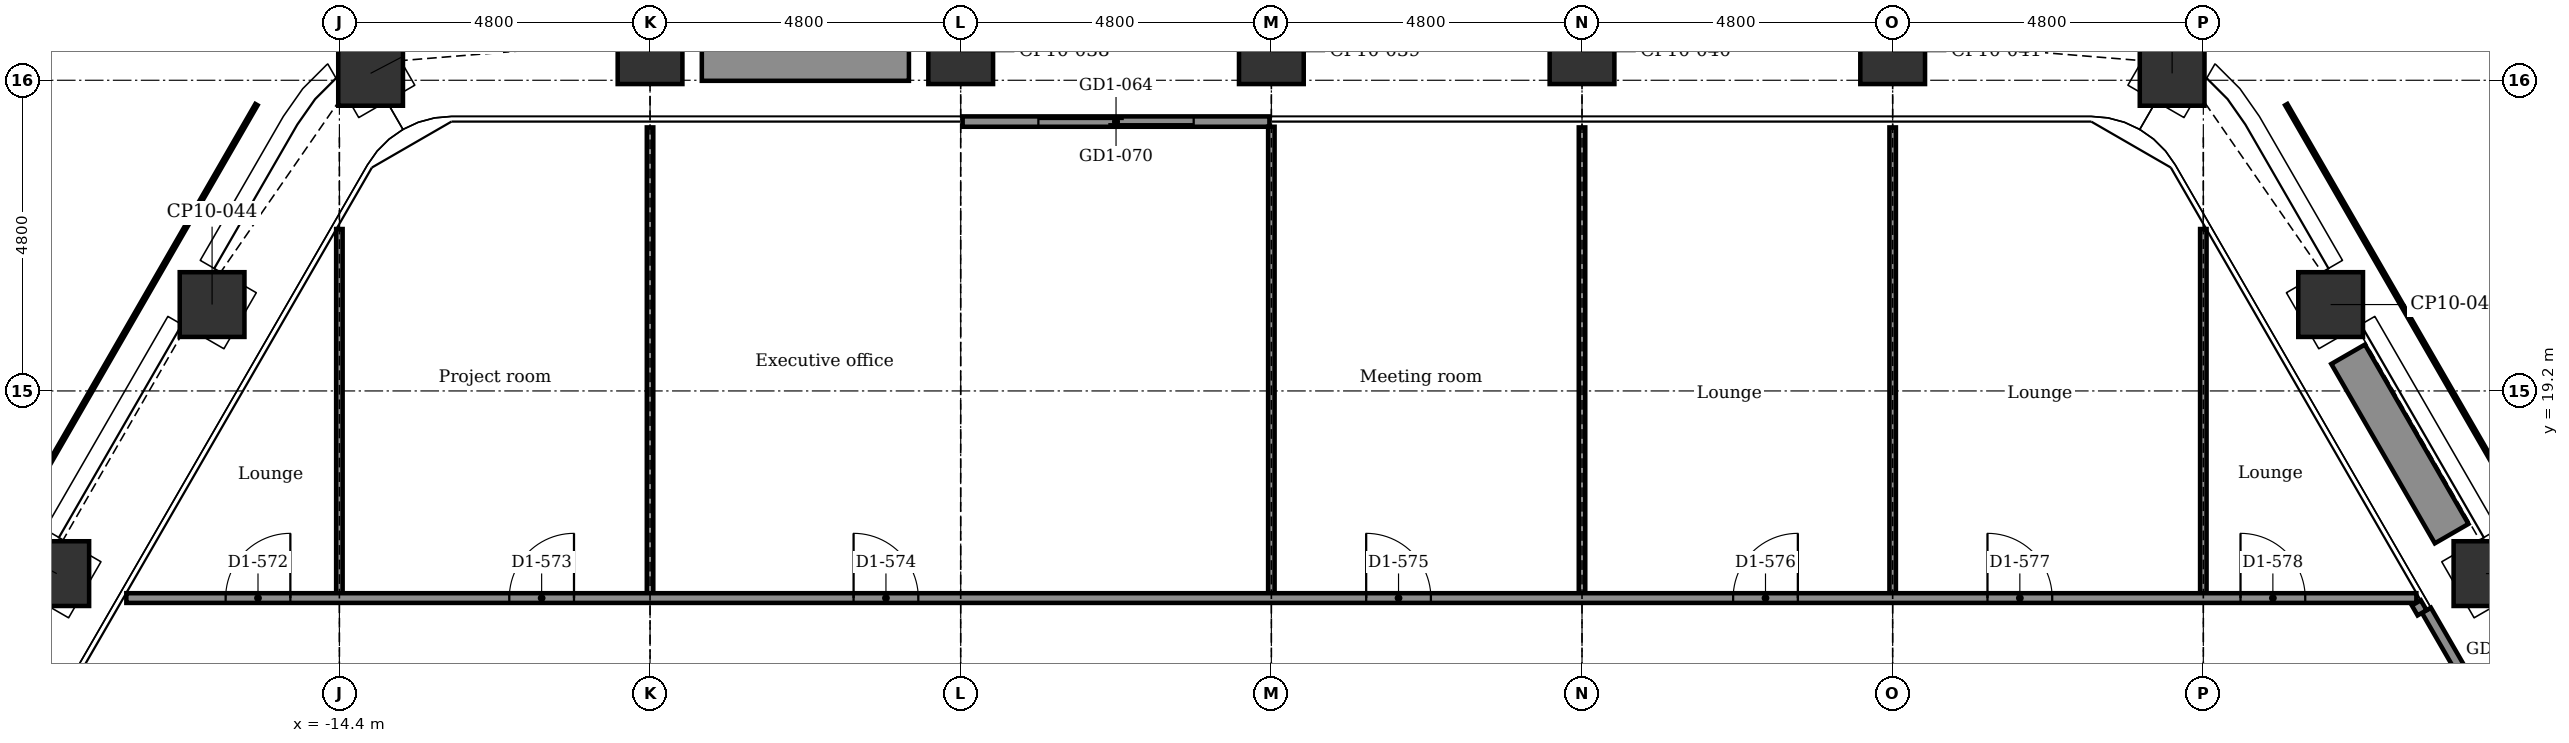
"""IFC4 building model, lengths in metres.
Left out: names, types, materials, properties, quantities, classifications, styles, units other than length and angle.
Written with IfcOpenShell. Run it as: python <this file> out.ifc"""

import sys

from ifc_helpers import new_model, si_unit, direction, frame, frame_2d, origin, origin_2d, place, context, subcontext, project, spatial, rectangle, extrude, element, fill, save


model = new_model("IFC4")
c1 = context("Model", 3, precision=1e-05, world=origin(), true_north=direction((0.0, 1.0)))
c2 = subcontext(c1, "Body", "Model", "MODEL_VIEW")
j1 = project(units=[si_unit("LENGTHUNIT", "METRE"), si_unit("PLANEANGLEUNIT", "RADIAN")], contexts=[c1])
p1 = place(None, origin())
s1 = spatial("IfcSite", under=j1, at=p1, CompositionType="ELEMENT")
p2 = place(p1, origin())
s2 = spatial("IfcBuilding", under=s1, at=p2, CompositionType="ELEMENT")
p3 = place(p2, frame((0.0, 0.0, 201.2)))
s3 = spatial("IfcBuildingStorey", under=s2, at=p3, CompositionType="ELEMENT", Elevation=201.2)
for number, where, z_axis, x_axis in (
    (1, (-13.918, 24.107, -0.15), (0.0, 0.0, 1.0), (0.866, 0.5, 0.0)),
    (2, (-9.6, 24.442, -0.15), (0.0, 0.0, 1.0), (1.0, 0.0, 0.0)),
    (3, (-4.8, 24.442, -0.15), (0.0, 0.0, 1.0), (1.0, 0.0, 0.0)),
    (4, (0.0, 24.442, -0.15), (0.0, 0.0, 1.0), (1.0, 0.0, 0.0)),
    (5, (4.8, 24.442, -0.15), (0.0, 0.0, 1.0), (1.0, 0.0, 0.0)),
    (6, (9.6, 24.442, -0.15), (0.0, 0.0, 1.0), (1.0, 0.0, 0.0)),
    (7, (13.918, 24.107, -0.15), (0.0, 0.0, 1.0), (0.5, 0.866, 0.0)),
    (8, (16.367, 20.535, -0.15), (0.0, 0.0, 1.0), (0.866, 0.5, 0.0)),
    (9, (18.767, 16.378, -0.15), (0.0, 0.0, 1.0), (0.866, 0.5, 0.0)),
    (10, (-18.767, 16.378, -0.15), (0.0, 0.0, 1.0), (0.5, 0.866, 0.0)),
    (11, (-16.367, 20.535, -0.15), (0.0, 0.0, 1.0), (0.5, 0.866, 0.0)),
):
    element("IfcColumn", number, at=place(p3, frame(where, z_axis=z_axis, x_axis=x_axis)), inside=s3, PredefinedType="COLUMN", context=c2, shape_type="SweptSolid", body=[
        extrude(rectangle(XDim=1.0, YDim=1.0, at=origin_2d()), origin(), (0.0, 0.0, 1.0), 3.9),
    ])
p4 = place(p3, frame((-4.77, 23.362, 0.0), z_axis=(0.0, 0.0, 1.0), x_axis=(1.0, 0.0, 0.0)))
e12 = element("IfcWall", 12, at=p4, inside=s3, PredefinedType="PARTITIONING", context=c2, shape_type="SweptSolid", body=[
    extrude(rectangle(XDim=4.74, YDim=0.16, at=frame_2d((2.37, 0.0))), origin(), (0.0, 0.0, 1.0), 3.75),
])
p5 = place(p4, frame((1.17, 0.0, 0.0)))
e13 = element("IfcOpeningElement", 13, at=p5, cuts=e12, PredefinedType="OPENING", context=c2, shape_type="SweptSolid", body=[
    extrude(rectangle(XDim=2.4, YDim=2.4, at=frame_2d((1.2, 1.2))), frame((0.0, 0.09, 0.0), z_axis=(0.0, -1.0, 0.0), x_axis=(1.0, 0.0, 0.0)), (0.0, 0.0, 1.0), 0.18),
])
p6 = place(p3, frame((17.847, 15.812, 0.0), z_axis=(0.0, 0.0, 1.0), x_axis=(0.5000167099, -0.866015756104, 0.0)))
e14 = element("IfcWall", 14, at=p6, inside=s3, PredefinedType="PARTITIONING", context=c2, shape_type="SweptSolid", body=[
    extrude(rectangle(XDim=4.74, YDim=0.16, at=frame_2d((2.37, 0.0))), origin(), (0.0, 0.0, 1.0), 3.75),
])
p7 = place(p6, frame((1.17, 0.0, 0.0)))
e15 = element("IfcOpeningElement", 15, at=p7, cuts=e14, PredefinedType="OPENING", context=c2, shape_type="SweptSolid", body=[
    extrude(rectangle(XDim=2.4, YDim=2.4, at=frame_2d((1.2, 1.2))), frame((0.0, 0.09, 0.0), z_axis=(0.0, -1.0, 0.0), x_axis=(1.0, 0.0, 0.0)), (0.0, 0.0, 1.0), 0.18),
])
for number, where, z_axis, x_axis in (
    (16, (-8.8, 24.292, 0.0), (0.0, 0.0, 1.0), (1.0, 0.0, 0.0)),
    (17, (16.637, 19.767, 0.0), (0.0, 0.0, 1.0), (0.5, -0.866, 0.0)),
):
    element("IfcWall", number, at=place(p3, frame(where, z_axis=z_axis, x_axis=x_axis)), inside=s3, PredefinedType="USERDEFINED", context=c2, shape_type="SweptSolid", body=[
        extrude(rectangle(XDim=3.2, YDim=0.6, at=frame_2d((1.6, 0.0))), origin(), (0.0, 0.0, 1.0), 0.7),
    ])
p8 = place(p3, frame((14.4, 16.0, 0.0), z_axis=(0.0, 0.0, 1.0), x_axis=(0.0, 1.0, 0.0)))
e18 = element("IfcWall", 18, at=p8, inside=s3, PredefinedType="PARTITIONING", context=c2, shape_type="SweptSolid", body=[
    extrude(rectangle(XDim=5.701, YDim=0.1, at=frame_2d((2.851, 0.0))), origin(), (0.0, 0.0, 1.0), 3.066),
])
for number, where, z_axis, x_axis in (
    (19, (9.6, 16.0, 0.0), (0.0, 0.0, 1.0), (0.0, 1.0, 0.0)),
    (20, (4.8, 16.0, 0.0), (0.0, 0.0, 1.0), (0.0, 1.0, 0.0)),
):
    element("IfcWall", number, at=place(p3, frame(where, z_axis=z_axis, x_axis=x_axis)), inside=s3, PredefinedType="PARTITIONING", context=c2, shape_type="SweptSolid", body=[
        extrude(rectangle(XDim=7.271, YDim=0.1, at=frame_2d((3.636, 0.0))), origin(), (0.0, 0.0, 1.0), 3.066),
    ])
p9 = place(p3, frame((0.0, 16.0, 0.0), z_axis=(0.0, 0.0, 1.0), x_axis=(0.0, 1.0, 0.0)))
e21 = element("IfcWall", 21, at=p9, inside=s3, PredefinedType="PARTITIONING", context=c2, shape_type="SweptSolid", body=[
    extrude(rectangle(XDim=7.281, YDim=0.1, at=frame_2d((3.641, 0.0))), origin(), (0.0, 0.0, 1.0), 3.066),
])
p10 = place(p3, frame((-9.6, 16.0, 0.0), z_axis=(0.0, 0.0, 1.0), x_axis=(0.0, 1.0, 0.0)))
e22 = element("IfcWall", 22, at=p10, inside=s3, PredefinedType="PARTITIONING", context=c2, shape_type="SweptSolid", body=[
    extrude(rectangle(XDim=7.271, YDim=0.1, at=frame_2d((3.636, 0.0))), origin(), (0.0, 0.0, 1.0), 3.066),
])
p11 = place(p3, frame((-14.4, 16.0, 0.0), z_axis=(0.0, 0.0, 1.0), x_axis=(0.0, 1.0, 0.0)))
e23 = element("IfcWall", 23, at=p11, inside=s3, PredefinedType="PARTITIONING", context=c2, shape_type="SweptSolid", body=[
    extrude(rectangle(XDim=5.701, YDim=0.1, at=frame_2d((2.851, 0.0))), origin(), (0.0, 0.0, 1.0), 3.066),
])
p12 = place(p3, frame((-17.692, 16.0, 0.0), z_axis=(0.0, 0.0, 1.0), x_axis=(1.0, 0.0, 0.0)))
e24 = element("IfcWall", 24, at=p12, inside=s3, PredefinedType="PARTITIONING", context=c2, shape_type="SweptSolid", body=[
    extrude(rectangle(XDim=35.384, YDim=0.15, at=frame_2d((17.692, 0.0))), origin(), (0.0, 0.0, 1.0), 3.75),
])
p13 = place(p12, frame((1.534, 0.0, 0.0)))
e25 = element("IfcOpeningElement", 25, at=p13, cuts=e24, PredefinedType="OPENING", context=c2, shape_type="SweptSolid", body=[
    extrude(rectangle(XDim=1.0, YDim=2.1, at=frame_2d((0.5, 1.05))), frame((0.0, 0.085, 0.0), z_axis=(0.0, -1.0, 0.0), x_axis=(1.0, 0.0, 0.0)), (0.0, 0.0, 1.0), 0.17),
])
p14 = place(p12, frame((5.917, 0.0, 0.0)))
e26 = element("IfcOpeningElement", 26, at=p14, cuts=e24, PredefinedType="OPENING", context=c2, shape_type="SweptSolid", body=[
    extrude(rectangle(XDim=1.0, YDim=2.1, at=frame_2d((0.5, 1.05))), frame((0.0, 0.085, 0.0), z_axis=(0.0, -1.0, 0.0), x_axis=(1.0, 0.0, 0.0)), (0.0, 0.0, 1.0), 0.17),
])
p15 = place(p12, frame((11.237, 0.0, 0.0)))
e27 = element("IfcOpeningElement", 27, at=p15, cuts=e24, PredefinedType="OPENING", context=c2, shape_type="SweptSolid", body=[
    extrude(rectangle(XDim=1.0, YDim=2.1, at=frame_2d((0.5, 1.05))), frame((0.0, 0.085, 0.0), z_axis=(0.0, -1.0, 0.0), x_axis=(1.0, 0.0, 0.0)), (0.0, 0.0, 1.0), 0.17),
])
p16 = place(p12, frame((19.157, 0.0, 0.0)))
e28 = element("IfcOpeningElement", 28, at=p16, cuts=e24, PredefinedType="OPENING", context=c2, shape_type="SweptSolid", body=[
    extrude(rectangle(XDim=1.0, YDim=2.1, at=frame_2d((0.5, 1.05))), frame((0.0, 0.085, 0.0), z_axis=(0.0, -1.0, 0.0), x_axis=(1.0, 0.0, 0.0)), (0.0, 0.0, 1.0), 0.17),
])
p17 = place(p12, frame((24.827, 0.0, 0.0)))
e29 = element("IfcOpeningElement", 29, at=p17, cuts=e24, PredefinedType="OPENING", context=c2, shape_type="SweptSolid", body=[
    extrude(rectangle(XDim=1.0, YDim=2.1, at=frame_2d((0.5, 1.05))), frame((0.0, 0.085, 0.0), z_axis=(0.0, -1.0, 0.0), x_axis=(1.0, 0.0, 0.0)), (0.0, 0.0, 1.0), 0.17),
])
p18 = place(p12, frame((28.757, 0.0, 0.0)))
e30 = element("IfcOpeningElement", 30, at=p18, cuts=e24, PredefinedType="OPENING", context=c2, shape_type="SweptSolid", body=[
    extrude(rectangle(XDim=1.0, YDim=2.1, at=frame_2d((0.5, 1.05))), frame((0.0, 0.085, 0.0), z_axis=(0.0, -1.0, 0.0), x_axis=(1.0, 0.0, 0.0)), (0.0, 0.0, 1.0), 0.17),
])
p19 = place(p12, frame((32.667, 0.0, 0.0)))
e31 = element("IfcOpeningElement", 31, at=p19, cuts=e24, PredefinedType="OPENING", context=c2, shape_type="SweptSolid", body=[
    extrude(rectangle(XDim=1.0, YDim=2.1, at=frame_2d((0.5, 1.05))), frame((0.0, 0.085, 0.0), z_axis=(0.0, -1.0, 0.0), x_axis=(1.0, 0.0, 0.0)), (0.0, 0.0, 1.0), 0.17),
])
p20 = place(p3, frame((17.78, 15.772, 0.0), z_axis=(0.0, 0.0, 1.0), x_axis=(-0.499841654076, 0.866116805547, 0.0)))
e32 = element("IfcWall", 32, at=p20, inside=s3, PredefinedType="PARTITIONING", context=c2, shape_type="SweptSolid", body=[
    extrude(rectangle(XDim=0.177, YDim=0.16, at=frame_2d((0.089, 0.0))), origin(), (0.0, 0.0, 1.0), 3.75),
])
p21 = place(p5, origin())
e33 = element("IfcDoor", 33, at=p21, inside=s3, OperationType="DOUBLE_DOOR_SLIDING", PredefinedType="DOOR", context=c2, shape_type="SweptSolid", body=[
    extrude(rectangle(XDim=2.4, YDim=2.4, at=frame_2d((1.2, 1.2))), frame((0.0, 0.025, 0.0), z_axis=(0.0, -1.0, 0.0), x_axis=(1.0, 0.0, 0.0)), (0.0, 0.0, 1.0), 0.05),
])
fill(e13, e33)
p22 = place(p13, origin())
e34 = element("IfcDoor", 34, at=p22, inside=s3, OperationType="SINGLE_SWING_RIGHT", PredefinedType="DOOR", context=c2, shape_type="SweptSolid", body=[
    extrude(rectangle(XDim=1.0, YDim=2.1, at=frame_2d((0.5, 1.05))), frame((0.0, 0.025, 0.0), z_axis=(0.0, -1.0, 0.0), x_axis=(1.0, 0.0, 0.0)), (0.0, 0.0, 1.0), 0.05),
])
fill(e25, e34)
p23 = place(p14, origin())
e35 = element("IfcDoor", 35, at=p23, inside=s3, OperationType="SINGLE_SWING_RIGHT", PredefinedType="DOOR", context=c2, shape_type="SweptSolid", body=[
    extrude(rectangle(XDim=1.0, YDim=2.1, at=frame_2d((0.5, 1.05))), frame((0.0, 0.025, 0.0), z_axis=(0.0, -1.0, 0.0), x_axis=(1.0, 0.0, 0.0)), (0.0, 0.0, 1.0), 0.05),
])
fill(e26, e35)
p24 = place(p15, origin())
e36 = element("IfcDoor", 36, at=p24, inside=s3, OperationType="SINGLE_SWING_LEFT", PredefinedType="DOOR", context=c2, shape_type="SweptSolid", body=[
    extrude(rectangle(XDim=1.0, YDim=2.1, at=frame_2d((0.5, 1.05))), frame((0.0, 0.025, 0.0), z_axis=(0.0, -1.0, 0.0), x_axis=(1.0, 0.0, 0.0)), (0.0, 0.0, 1.0), 0.05),
])
fill(e27, e36)
p25 = place(p16, origin())
e37 = element("IfcDoor", 37, at=p25, inside=s3, OperationType="SINGLE_SWING_LEFT", PredefinedType="DOOR", context=c2, shape_type="SweptSolid", body=[
    extrude(rectangle(XDim=1.0, YDim=2.1, at=frame_2d((0.5, 1.05))), frame((0.0, 0.025, 0.0), z_axis=(0.0, -1.0, 0.0), x_axis=(1.0, 0.0, 0.0)), (0.0, 0.0, 1.0), 0.05),
])
fill(e28, e37)
p26 = place(p17, origin())
e38 = element("IfcDoor", 38, at=p26, inside=s3, OperationType="SINGLE_SWING_RIGHT", PredefinedType="DOOR", context=c2, shape_type="SweptSolid", body=[
    extrude(rectangle(XDim=1.0, YDim=2.1, at=frame_2d((0.5, 1.05))), frame((0.0, 0.025, 0.0), z_axis=(0.0, -1.0, 0.0), x_axis=(1.0, 0.0, 0.0)), (0.0, 0.0, 1.0), 0.05),
])
fill(e29, e38)
p27 = place(p18, origin())
e39 = element("IfcDoor", 39, at=p27, inside=s3, OperationType="SINGLE_SWING_LEFT", PredefinedType="DOOR", context=c2, shape_type="SweptSolid", body=[
    extrude(rectangle(XDim=1.0, YDim=2.1, at=frame_2d((0.5, 1.05))), frame((0.0, 0.025, 0.0), z_axis=(0.0, -1.0, 0.0), x_axis=(1.0, 0.0, 0.0)), (0.0, 0.0, 1.0), 0.05),
])
fill(e30, e39)
p28 = place(p19, origin())
e40 = element("IfcDoor", 40, at=p28, inside=s3, OperationType="SINGLE_SWING_LEFT", PredefinedType="DOOR", context=c2, shape_type="SweptSolid", body=[
    extrude(rectangle(XDim=1.0, YDim=2.1, at=frame_2d((0.5, 1.05))), frame((0.0, 0.025, 0.0), z_axis=(0.0, -1.0, 0.0), x_axis=(1.0, 0.0, 0.0)), (0.0, 0.0, 1.0), 0.05),
])
fill(e31, e40)
save(model, sys.argv[1])
